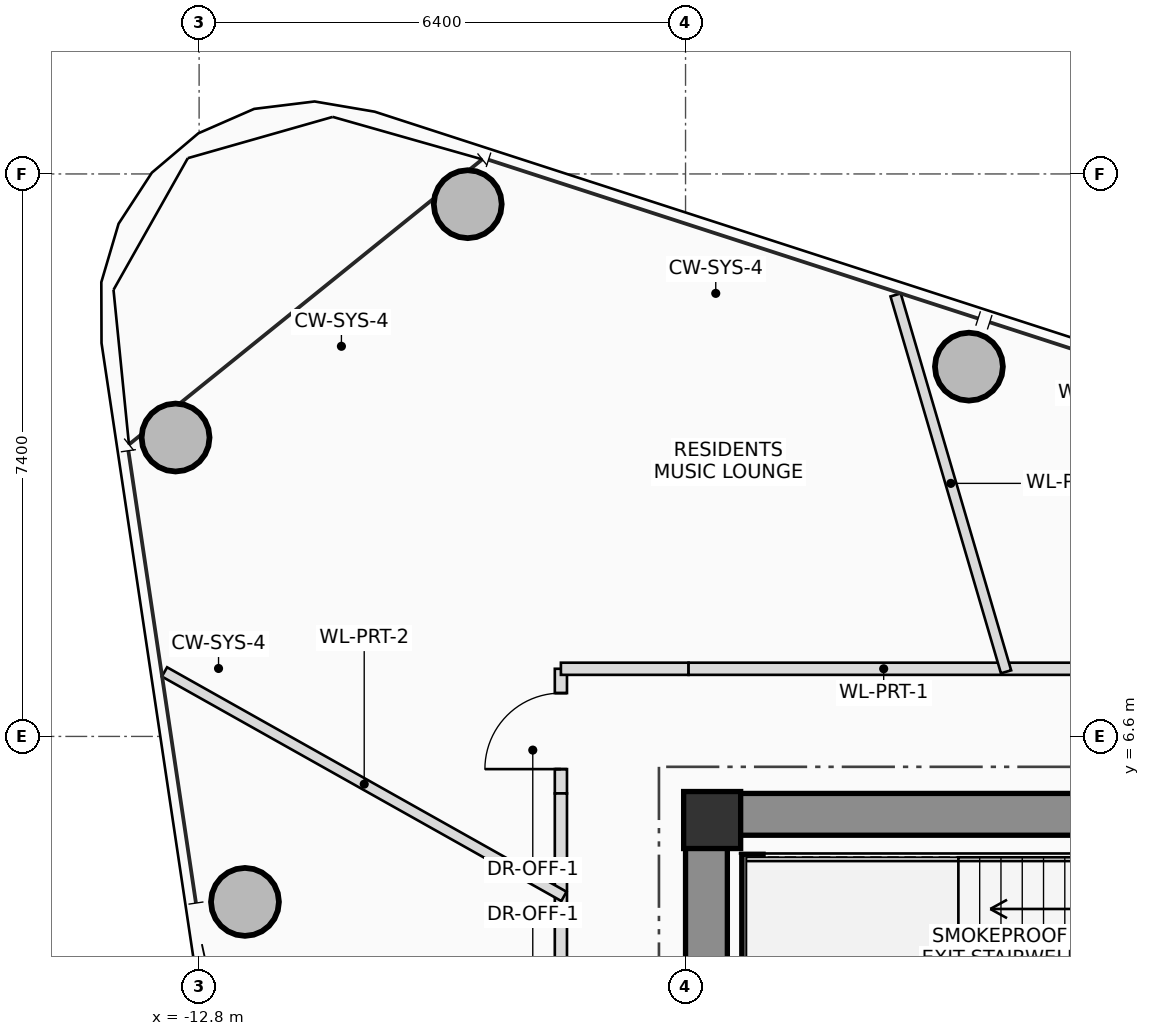
"""IFC4 building model, lengths in metres.
Left out: names, types, materials, properties, quantities, classifications, styles, units other than length and angle.
Written with IfcOpenShell. Run it as: python <this file> out.ifc"""

import sys

from ifc_helpers import new_model, si_unit, direction, frame, frame_2d, origin, origin_2d, place, context, subcontext, project, spatial, rectangle, hollow_circle, extrude, source, transform, mapped, element, fill, save


model = new_model("IFC4")
c1 = context("Model", 3, precision=1e-05, world=origin(), true_north=direction((0.0, 1.0)))
c2 = subcontext(c1, "Body", "Model", "MODEL_VIEW")
j1 = project(units=[si_unit("LENGTHUNIT", "METRE"), si_unit("PLANEANGLEUNIT", "RADIAN")], contexts=[c1])
p1 = place(None, origin())
s1 = spatial("IfcSite", under=j1, at=p1, CompositionType="ELEMENT")
p2 = place(p1, origin())
s2 = spatial("IfcBuilding", under=s1, at=p2, CompositionType="ELEMENT")
p3 = place(p2, frame((0.0, 0.0, 260.95)))
s3 = spatial("IfcBuildingStorey", under=s2, at=p3, CompositionType="ELEMENT", Elevation=260.95)
m1 = source(origin(), c2, "Body", "SweptSolid", [
    extrude(rectangle(XDim=0.75, YDim=0.75, at=origin_2d()), origin(), (0.0, 0.0, 1.0), 3.4),
])
p4 = place(p3, frame((-6.05, 5.5, 0.0), z_axis=(0.0, 0.0, 1.0), x_axis=(1.0, 0.0, 0.0)))
e1 = element("IfcColumn", 1, at=p4, inside=s3, PredefinedType="COLUMN", context=c2, shape_type="MappedRepresentation", body=[
    mapped(m1, transform((0.0, 0.0, 0.0), scale=1.0)),
])
p5 = place(p3, frame((-6.4, 5.575, 0.0), z_axis=(0.0, 0.0, 1.0), x_axis=(1.0, 0.0, 0.0)))
e2 = element("IfcWall", 2, at=p5, inside=s3, PredefinedType="SHEAR", context=c2, shape_type="SweptSolid", body=[
    extrude(rectangle(XDim=12.8, YDim=0.55, at=frame_2d((6.4, 0.0))), origin(), (0.0, 0.0, 1.0), 3.4),
])
p6 = place(p5, frame((8.6, 0.0, 0.0)))
e3 = element("IfcOpeningElement", 3, at=p6, cuts=e2, PredefinedType="OPENING", context=c2, shape_type="SweptSolid", body=[
    extrude(rectangle(XDim=1.2, YDim=2.2, at=frame_2d((0.6, 1.1))), frame((0.0, 0.285, 0.0), z_axis=(0.0, -1.0, 0.0), x_axis=(1.0, 0.0, 0.0)), (0.0, 0.0, 1.0), 0.57),
])
p7 = place(p3, frame((-6.125, 1.75, 0.0), z_axis=(0.0, 0.0, 1.0), x_axis=(0.0, 1.0, 0.0)))
e4 = element("IfcWall", 4, at=p7, inside=s3, PredefinedType="SHEAR", context=c2, shape_type="SweptSolid", body=[
    extrude(rectangle(XDim=3.55, YDim=0.55, at=frame_2d((1.775, 0.0))), origin(), (0.0, 0.0, 1.0), 3.4),
])
p8 = place(p3, frame((-5.52, 2.3, 0.0), z_axis=(0.0, 0.0, 1.0), x_axis=(0.0, 1.0, 0.0)))
e5 = element("IfcWall", 5, at=p8, inside=s3, PredefinedType="SHEAR", context=c2, shape_type="SweptSolid", body=[
    extrude(rectangle(XDim=2.75, YDim=0.28, at=frame_2d((1.375, 0.0))), origin(), (0.0, 0.0, 1.0), 3.4),
])
m2 = source(origin(), c2, "Body", "SweptSolid", [
    extrude(hollow_circle(Radius=0.45, WallThickness=0.032, at=origin_2d()), origin(), (0.0, 0.0, 1.0), 3.4),
])
for number, where, z_axis, x_axis in (
    (6, (-2.672, 11.465, 0.0), (0.0, 0.0, 1.0), (1.0, 0.0, 0.0)),
    (7, (-9.266, 13.602, 0.0), (0.0, 0.0, 1.0), (1.0, 0.0, 0.0)),
    (8, (-13.11, 10.532, 0.0), (0.0, 0.0, 1.0), (1.0, 0.0, 0.0)),
    (9, (-12.197, 4.423, 0.0), (0.0, 0.0, 1.0), (1.0, 0.0, 0.0)),
):
    element("IfcColumn", number, at=place(p3, frame(where, z_axis=z_axis, x_axis=x_axis)), inside=s3, PredefinedType="COLUMN", context=c2, shape_type="MappedRepresentation", body=[
        mapped(m2, transform((0.0, 0.0, 0.0), scale=1.0)),
    ])
p9 = place(p3, frame((-8.04, 5.85, 0.0), z_axis=(0.0, 0.0, 1.0), x_axis=(0.0, 1.0, 0.0)))
e10 = element("IfcWall", 10, at=p9, inside=s3, PredefinedType="PARTITIONING", context=c2, shape_type="SweptSolid", body=[
    extrude(rectangle(XDim=1.64, YDim=0.16, at=frame_2d((0.82, 0.0))), origin(), (0.0, 0.0, 1.0), 2.605),
])
p10 = place(p9, frame((0.32, 0.0, 0.0)))
e11 = element("IfcOpeningElement", 11, at=p10, cuts=e10, PredefinedType="OPENING", context=c2, shape_type="SweptSolid", body=[
    extrude(rectangle(XDim=1.0, YDim=2.25, at=frame_2d((0.5, 1.125))), frame((0.0, 0.09, 0.0), z_axis=(0.0, -1.0, 0.0), x_axis=(1.0, 0.0, 0.0)), (0.0, 0.0, 1.0), 0.18),
])
p11 = place(p3, frame((-8.04, 7.49, 0.0), z_axis=(0.0, 0.0, 1.0), x_axis=(1.0, 0.0, 0.0)))
e12 = element("IfcWall", 12, at=p11, inside=s3, PredefinedType="PARTITIONING", context=c2, shape_type="SweptSolid", body=[
    extrude(rectangle(XDim=1.68, YDim=0.16, at=frame_2d((0.84, 0.0))), origin(), (0.0, 0.0, 1.0), 2.605),
])
p12 = place(p3, frame((-6.36, 7.49, 0.0), z_axis=(0.0, 0.0, 1.0), x_axis=(1.0, 0.0, 0.0)))
e13 = element("IfcWall", 13, at=p12, inside=s3, PredefinedType="PARTITIONING", context=c2, shape_type="SweptSolid", body=[
    extrude(rectangle(XDim=9.81, YDim=0.16, at=frame_2d((4.905, 0.0))), origin(), (0.0, 0.0, 1.0), 2.605),
])
p13 = place(p12, frame((5.284, 0.0, 0.0)))
e14 = element("IfcOpeningElement", 14, at=p13, cuts=e13, PredefinedType="OPENING", context=c2, shape_type="SweptSolid", body=[
    extrude(rectangle(XDim=1.0, YDim=2.25, at=frame_2d((0.5, 1.125))), frame((0.0, 0.09, 0.0), z_axis=(0.0, -1.0, 0.0), x_axis=(1.0, 0.0, 0.0)), (0.0, 0.0, 1.0), 0.18),
])
p14 = place(p12, frame((8.023, 0.0, 0.0)))
e15 = element("IfcOpeningElement", 15, at=p14, cuts=e13, PredefinedType="OPENING", context=c2, shape_type="SweptSolid", body=[
    extrude(rectangle(XDim=1.0, YDim=2.25, at=frame_2d((0.5, 1.125))), frame((0.0, 0.09, 0.0), z_axis=(0.0, -1.0, 0.0), x_axis=(1.0, 0.0, 0.0)), (0.0, 0.0, 1.0), 0.18),
])
p15 = place(p3, frame((-8.04, -5.85, 0.0), z_axis=(0.0, 0.0, 1.0), x_axis=(0.0, 1.0, 0.0)))
e16 = element("IfcWall", 16, at=p15, inside=s3, PredefinedType="PARTITIONING", context=c2, shape_type="SweptSolid", body=[
    extrude(rectangle(XDim=11.7, YDim=0.16, at=frame_2d((5.85, 0.0))), origin(), (0.0, 0.0, 1.0), 2.605),
])
p16 = place(p15, frame((2.661, 0.0, 0.0)))
e17 = element("IfcOpeningElement", 17, at=p16, cuts=e16, PredefinedType="OPENING", context=c2, shape_type="SweptSolid", body=[
    extrude(rectangle(XDim=1.0, YDim=2.25, at=frame_2d((0.5, 1.125))), frame((0.0, 0.09, 0.0), z_axis=(0.0, -1.0, 0.0), x_axis=(1.0, 0.0, 0.0)), (0.0, 0.0, 1.0), 0.18),
])
p17 = place(p15, frame((7.771, 0.0, 0.0)))
e18 = element("IfcOpeningElement", 18, at=p17, cuts=e16, PredefinedType="OPENING", context=c2, shape_type="SweptSolid", body=[
    extrude(rectangle(XDim=1.0, YDim=2.25, at=frame_2d((0.5, 1.125))), frame((0.0, 0.09, 0.0), z_axis=(0.0, -1.0, 0.0), x_axis=(1.0, 0.0, 0.0)), (0.0, 0.0, 1.0), 0.18),
])
p18 = place(p3, frame((-2.183, 7.45, 0.0), z_axis=(0.0, 0.0, 1.0), x_axis=(-0.281242676509, 0.95963667964, 0.0)))
e19 = element("IfcWall", 19, at=p18, inside=s3, PredefinedType="PARTITIONING", context=c2, shape_type="SweptSolid", body=[
    extrude(rectangle(XDim=5.167, YDim=0.14, at=frame_2d((2.583, 0.0))), origin(), (0.0, 0.0, 1.0), 2.605),
])
p19 = place(p3, frame((-8.0, 4.496, 0.0), z_axis=(0.0, 0.0, 1.0), x_axis=(-0.871799326596, 0.489863179008, 0.0)))
e20 = element("IfcWall", 20, at=p19, inside=s3, PredefinedType="PARTITIONING", context=c2, shape_type="SweptSolid", body=[
    extrude(rectangle(XDim=6.029, YDim=0.14, at=frame_2d((3.014, 0.0))), origin(), (0.0, 0.0, 1.0), 2.605),
])
p20 = place(p10, origin())
e21 = element("IfcDoor", 21, at=p20, inside=s3, OperationType="SINGLE_SWING_LEFT", PredefinedType="DOOR", context=c2, shape_type="SweptSolid", body=[
    extrude(rectangle(XDim=1.0, YDim=2.25, at=frame_2d((0.5, 1.125))), frame((0.0, 0.025, 0.0), z_axis=(0.0, -1.0, 0.0), x_axis=(1.0, 0.0, 0.0)), (0.0, 0.0, 1.0), 0.05),
])
fill(e11, e21)
save(model, sys.argv[1])
